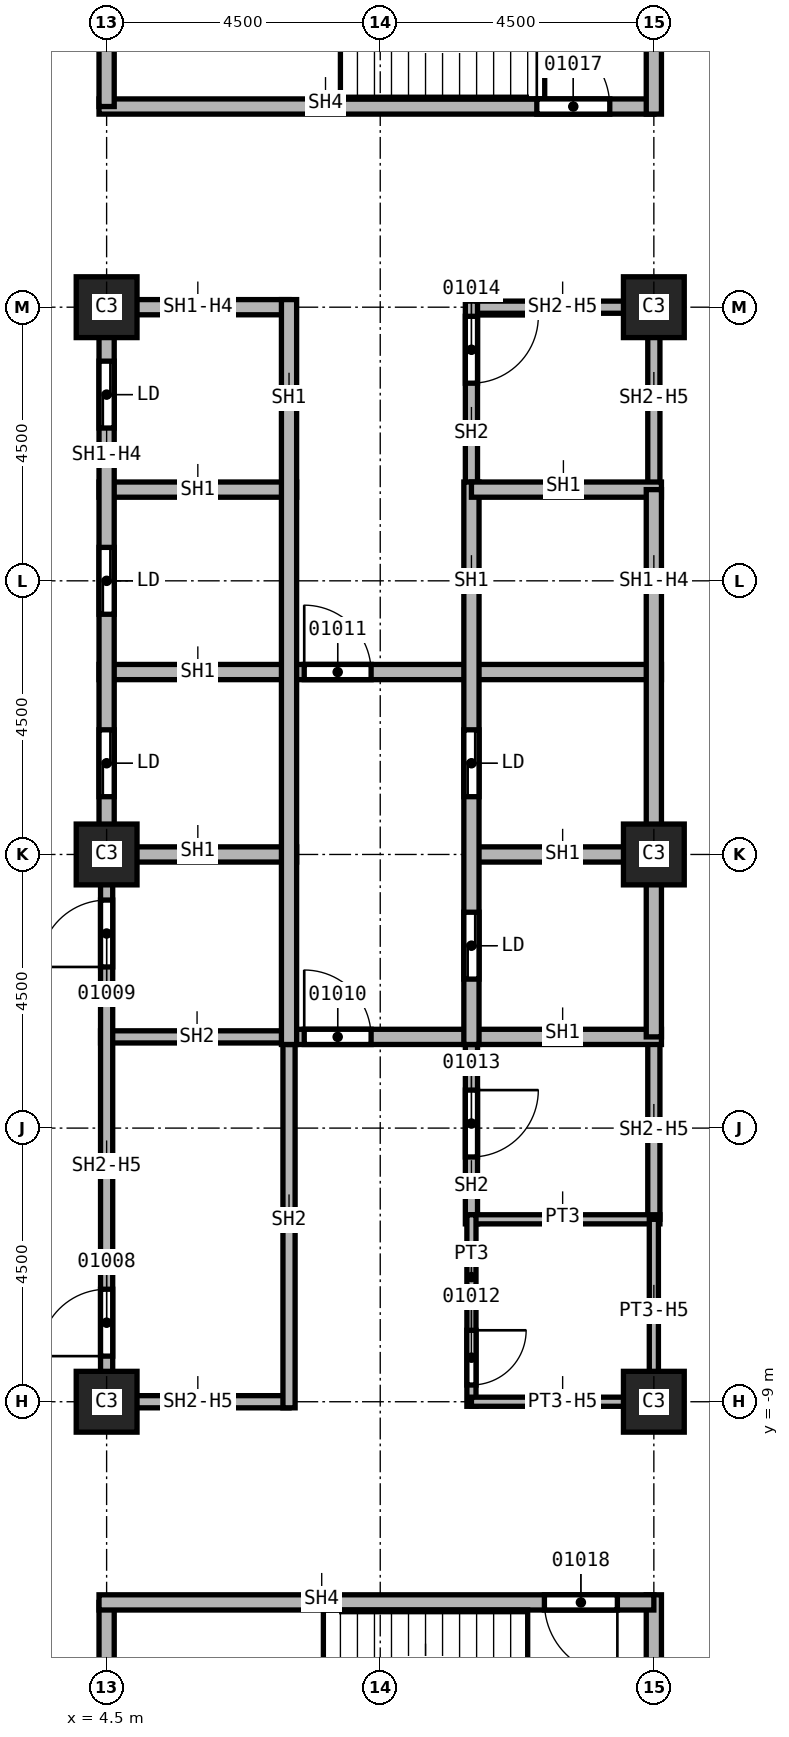
"""IFC4 building model, lengths in metres.
Left out: names, types, materials, properties, quantities, classifications, styles, units other than length and angle.
Written with IfcOpenShell. Run it as: python <this file> out.ifc"""

import sys

from ifc_helpers import new_model, si_unit, direction, frame, frame_2d, origin, origin_2d, place, context, subcontext, project, spatial, rectangle, extrude, element, fill, save


model = new_model("IFC4")
c1 = context("Model", 3, precision=1e-05, world=origin(), true_north=direction((0.0, 1.0)))
c2 = subcontext(c1, "Body", "Model", "MODEL_VIEW")
j1 = project(units=[si_unit("LENGTHUNIT", "METRE"), si_unit("PLANEANGLEUNIT", "RADIAN")], contexts=[c1])
p1 = place(None, origin())
s1 = spatial("IfcSite", under=j1, at=p1, CompositionType="ELEMENT")
p2 = place(p1, origin())
s2 = spatial("IfcBuilding", under=s1, at=p2, CompositionType="ELEMENT")
p3 = place(p2, frame((0.0, 0.0, 72.0)))
s3 = spatial("IfcBuildingStorey", under=s2, at=p3, CompositionType="ELEMENT", Elevation=72.0)
for number, where, z_axis, x_axis in (
    (1, (4.5, 0.0, 0.0), (0.0, 0.0, 1.0), (1.0, 0.0, 0.0)),
    (2, (4.5, 9.0, 0.0), (0.0, 0.0, 1.0), (1.0, 0.0, 0.0)),
    (3, (4.5, -9.0, 0.0), (0.0, 0.0, 1.0), (1.0, 0.0, 0.0)),
    (4, (13.5, 0.0, 0.0), (0.0, 0.0, 1.0), (1.0, 0.0, 0.0)),
    (5, (13.5, 9.0, 0.0), (0.0, 0.0, 1.0), (1.0, 0.0, 0.0)),
    (6, (13.5, -9.0, 0.0), (0.0, 0.0, 1.0), (1.0, 0.0, 0.0)),
):
    element("IfcColumn", number, at=place(p3, frame(where, z_axis=z_axis, x_axis=x_axis)), inside=s3, PredefinedType="COLUMN", context=c2, shape_type="SweptSolid", body=[
        extrude(rectangle(XDim=1.0, YDim=1.0, at=origin_2d()), origin(), (0.0, 0.0, 1.0), 3.7),
    ])
p4 = place(p3, frame((4.4, -3.0, 0.0), z_axis=(0.0, 0.0, 1.0), x_axis=(1.0, 0.0, 0.0)))
e7 = element("IfcWall", 7, at=p4, inside=s3, PredefinedType="SOLIDWALL", context=c2, shape_type="SweptSolid", body=[
    extrude(rectangle(XDim=3.225, YDim=0.2, at=frame_2d((1.613, 0.0))), origin(), (0.0, 0.0, 1.0), 3.7),
])
p5 = place(p3, frame((4.5, -9.1, 0.0), z_axis=(0.0, 0.0, 1.0), x_axis=(0.0, 1.0, 0.0)))
e8 = element("IfcWall", 8, at=p5, inside=s3, PredefinedType="SOLIDWALL", context=c2, shape_type="SweptSolid", body=[
    extrude(rectangle(XDim=9.1, YDim=0.2, at=frame_2d((4.55, 0.0))), origin(), (0.0, 0.0, 1.0), 2.938),
])
p6 = place(p5, frame((0.85, 0.0, 0.0)))
e9 = element("IfcOpeningElement", 9, at=p6, cuts=e8, PredefinedType="OPENING", context=c2, shape_type="SweptSolid", body=[
    extrude(rectangle(XDim=1.1, YDim=2.1, at=frame_2d((0.55, 1.05))), frame((0.0, 0.1, 0.0), z_axis=(0.0, -1.0, 0.0), x_axis=(1.0, 0.0, 0.0)), (0.0, 0.0, 1.0), 0.2),
])
p7 = place(p5, frame((7.25, 0.0, 0.0)))
e10 = element("IfcOpeningElement", 10, at=p7, cuts=e8, PredefinedType="OPENING", context=c2, shape_type="SweptSolid", body=[
    extrude(rectangle(XDim=1.1, YDim=2.1, at=frame_2d((0.55, 1.05))), frame((0.0, 0.1, 0.0), z_axis=(0.0, -1.0, 0.0), x_axis=(1.0, 0.0, 0.0)), (0.0, 0.0, 1.0), 0.2),
])
p8 = place(p3, frame((7.5, -9.0, 0.0), z_axis=(0.0, 0.0, 1.0), x_axis=(-1.0, 0.0, 0.0)))
e11 = element("IfcWall", 11, at=p8, inside=s3, PredefinedType="SOLIDWALL", context=c2, shape_type="SweptSolid", body=[
    extrude(rectangle(XDim=3.0, YDim=0.2, at=frame_2d((1.5, 0.0))), origin(), (0.0, 0.0, 1.0), 2.938),
])
p9 = place(p3, frame((7.5, -2.875, 0.0), z_axis=(0.0, 0.0, 1.0), x_axis=(0.0, -1.0, 0.0)))
e12 = element("IfcWall", 12, at=p9, inside=s3, PredefinedType="SOLIDWALL", context=c2, shape_type="SweptSolid", body=[
    extrude(rectangle(XDim=6.225, YDim=0.2, at=frame_2d((3.113, 0.0))), origin(), (0.0, 0.0, 1.0), 3.7),
])
p10 = place(p3, frame((10.5, -2.875, 0.0), z_axis=(0.0, 0.0, 1.0), x_axis=(0.0, -1.0, 0.0)))
e13 = element("IfcWall", 13, at=p10, inside=s3, PredefinedType="SOLIDWALL", context=c2, shape_type="SweptSolid", body=[
    extrude(rectangle(XDim=3.2, YDim=0.2, at=frame_2d((1.6, 0.0))), origin(), (0.0, 0.0, 1.0), 3.7),
])
p11 = place(p10, frame((1.0, 0.0, 0.0)))
e14 = element("IfcOpeningElement", 14, at=p11, cuts=e13, PredefinedType="OPENING", context=c2, shape_type="SweptSolid", body=[
    extrude(rectangle(XDim=1.1, YDim=2.1, at=frame_2d((0.55, 1.05))), frame((0.0, 0.1, 0.0), z_axis=(0.0, -1.0, 0.0), x_axis=(1.0, 0.0, 0.0)), (0.0, 0.0, 1.0), 0.2),
])
p12 = place(p3, frame((10.5, 9.0, 0.0), z_axis=(0.0, 0.0, 1.0), x_axis=(1.0, 0.0, 0.0)))
e15 = element("IfcWall", 15, at=p12, inside=s3, PredefinedType="SOLIDWALL", context=c2, shape_type="SweptSolid", body=[
    extrude(rectangle(XDim=3.0, YDim=0.2, at=frame_2d((1.5, 0.0))), origin(), (0.0, 0.0, 1.0), 2.938),
])
p13 = place(p3, frame((10.5, 9.1, 0.0), z_axis=(0.0, 0.0, 1.0), x_axis=(0.0, -1.0, 0.0)))
e16 = element("IfcWall", 16, at=p13, inside=s3, PredefinedType="SOLIDWALL", context=c2, shape_type="SweptSolid", body=[
    extrude(rectangle(XDim=3.225, YDim=0.2, at=frame_2d((1.613, 0.0))), origin(), (0.0, 0.0, 1.0), 3.7),
])
p14 = place(p13, frame((0.25, 0.0, 0.0)))
e17 = element("IfcOpeningElement", 17, at=p14, cuts=e16, PredefinedType="OPENING", context=c2, shape_type="SweptSolid", body=[
    extrude(rectangle(XDim=1.1, YDim=2.1, at=frame_2d((0.55, 1.05))), frame((0.0, 0.1, 0.0), z_axis=(0.0, -1.0, 0.0), x_axis=(1.0, 0.0, 0.0)), (0.0, 0.0, 1.0), 0.2),
])
p15 = place(p3, frame((13.5, -3.0, 0.0), z_axis=(0.0, 0.0, 1.0), x_axis=(0.0, -1.0, 0.0)))
e18 = element("IfcWall", 18, at=p15, inside=s3, PredefinedType="SOLIDWALL", context=c2, shape_type="SweptSolid", body=[
    extrude(rectangle(XDim=3.0, YDim=0.2, at=frame_2d((1.5, 0.0))), origin(), (0.0, 0.0, 1.0), 2.938),
])
p16 = place(p3, frame((13.5, 9.1, 0.0), z_axis=(0.0, 0.0, 1.0), x_axis=(0.0, -1.0, 0.0)))
e19 = element("IfcWall", 19, at=p16, inside=s3, PredefinedType="SOLIDWALL", context=c2, shape_type="SweptSolid", body=[
    extrude(rectangle(XDim=3.1, YDim=0.2, at=frame_2d((1.55, 0.0))), origin(), (0.0, 0.0, 1.0), 2.938),
])
p17 = place(p3, frame((4.375, 0.0, 0.0), z_axis=(0.0, 0.0, 1.0), x_axis=(1.0, 0.0, 0.0)))
e20 = element("IfcWall", 20, at=p17, inside=s3, PredefinedType="SOLIDWALL", context=c2, shape_type="SweptSolid", body=[
    extrude(rectangle(XDim=3.25, YDim=0.25, at=frame_2d((1.625, 0.0))), origin(), (0.0, 0.0, 1.0), 3.7),
])
p18 = place(p3, frame((4.375, 3.0, 0.0), z_axis=(0.0, 0.0, 1.0), x_axis=(1.0, 0.0, 0.0)))
e21 = element("IfcWall", 21, at=p18, inside=s3, PredefinedType="SOLIDWALL", context=c2, shape_type="SweptSolid", body=[
    extrude(rectangle(XDim=9.25, YDim=0.25, at=frame_2d((4.625, 0.0))), origin(), (0.0, 0.0, 1.0), 3.7),
])
p19 = place(p18, frame((3.375, 0.0, 0.0)))
e22 = element("IfcOpeningElement", 22, at=p19, cuts=e21, PredefinedType="OPENING", context=c2, shape_type="SweptSolid", body=[
    extrude(rectangle(XDim=1.1, YDim=2.1, at=frame_2d((0.55, 1.05))), frame((0.0, 0.125, 0.0), z_axis=(0.0, -1.0, 0.0), x_axis=(1.0, 0.0, 0.0)), (0.0, 0.0, 1.0), 0.25),
])
p20 = place(p3, frame((4.375, 6.0, 0.0), z_axis=(0.0, 0.0, 1.0), x_axis=(1.0, 0.0, 0.0)))
e23 = element("IfcWall", 23, at=p20, inside=s3, PredefinedType="SOLIDWALL", context=c2, shape_type="SweptSolid", body=[
    extrude(rectangle(XDim=3.25, YDim=0.25, at=frame_2d((1.625, 0.0))), origin(), (0.0, 0.0, 1.0), 3.7),
])
p21 = place(p3, frame((4.5, 0.0, 0.0), z_axis=(0.0, 0.0, 1.0), x_axis=(0.0, 1.0, 0.0)))
e24 = element("IfcWall", 24, at=p21, inside=s3, PredefinedType="SOLIDWALL", context=c2, shape_type="SweptSolid", body=[
    extrude(rectangle(XDim=9.125, YDim=0.25, at=frame_2d((4.562, 0.0))), origin(), (0.0, 0.0, 1.0), 2.938),
])
p22 = place(p21, frame((0.95, 0.0, 0.0)))
e25 = element("IfcOpeningElement", 25, at=p22, cuts=e24, PredefinedType="OPENING", context=c2, shape_type="SweptSolid", body=[
    extrude(rectangle(XDim=1.1, YDim=2.1, at=frame_2d((0.55, 1.05))), frame((0.0, 0.125, 0.0), z_axis=(0.0, -1.0, 0.0), x_axis=(1.0, 0.0, 0.0)), (0.0, 0.0, 1.0), 0.25),
])
p23 = place(p21, frame((3.95, 0.0, 0.0)))
e26 = element("IfcOpeningElement", 26, at=p23, cuts=e24, PredefinedType="OPENING", context=c2, shape_type="SweptSolid", body=[
    extrude(rectangle(XDim=1.1, YDim=2.1, at=frame_2d((0.55, 1.05))), frame((0.0, 0.125, 0.0), z_axis=(0.0, -1.0, 0.0), x_axis=(1.0, 0.0, 0.0)), (0.0, 0.0, 1.0), 0.25),
])
p24 = place(p21, frame((7.012, 0.0, 0.0)))
e27 = element("IfcOpeningElement", 27, at=p24, cuts=e24, PredefinedType="OPENING", context=c2, shape_type="SweptSolid", body=[
    extrude(rectangle(XDim=1.1, YDim=2.1, at=frame_2d((0.55, 1.05))), frame((0.0, 0.125, 0.0), z_axis=(0.0, -1.0, 0.0), x_axis=(1.0, 0.0, 0.0)), (0.0, 0.0, 1.0), 0.25),
])
p25 = place(p3, frame((4.5, 9.0, 0.0), z_axis=(0.0, 0.0, 1.0), x_axis=(1.0, 0.0, 0.0)))
e28 = element("IfcWall", 28, at=p25, inside=s3, PredefinedType="SOLIDWALL", context=c2, shape_type="SweptSolid", body=[
    extrude(rectangle(XDim=3.0, YDim=0.25, at=frame_2d((1.5, 0.0))), origin(), (0.0, 0.0, 1.0), 2.938),
])
p26 = place(p3, frame((7.5, -3.0, 0.0), z_axis=(0.0, 0.0, 1.0), x_axis=(1.0, 0.0, 0.0)))
e29 = element("IfcWall", 29, at=p26, inside=s3, PredefinedType="SOLIDWALL", context=c2, shape_type="SweptSolid", body=[
    extrude(rectangle(XDim=6.125, YDim=0.25, at=frame_2d((3.062, 0.0))), origin(), (0.0, 0.0, 1.0), 3.7),
])
p27 = place(p26, frame((0.25, 0.0, 0.0)))
e30 = element("IfcOpeningElement", 30, at=p27, cuts=e29, PredefinedType="OPENING", context=c2, shape_type="SweptSolid", body=[
    extrude(rectangle(XDim=1.1, YDim=2.1, at=frame_2d((0.55, 1.05))), frame((0.0, 0.125, 0.0), z_axis=(0.0, -1.0, 0.0), x_axis=(1.0, 0.0, 0.0)), (0.0, 0.0, 1.0), 0.25),
])
p28 = place(p3, frame((7.5, 9.125, 0.0), z_axis=(0.0, 0.0, 1.0), x_axis=(0.0, -1.0, 0.0)))
e31 = element("IfcWall", 31, at=p28, inside=s3, PredefinedType="SOLIDWALL", context=c2, shape_type="SweptSolid", body=[
    extrude(rectangle(XDim=12.25, YDim=0.25, at=frame_2d((6.125, 0.0))), origin(), (0.0, 0.0, 1.0), 3.7),
])
p29 = place(p3, frame((10.5, 0.0, 0.0), z_axis=(0.0, 0.0, 1.0), x_axis=(1.0, 0.0, 0.0)))
e32 = element("IfcWall", 32, at=p29, inside=s3, PredefinedType="SOLIDWALL", context=c2, shape_type="SweptSolid", body=[
    extrude(rectangle(XDim=3.125, YDim=0.25, at=frame_2d((1.562, 0.0))), origin(), (0.0, 0.0, 1.0), 3.7),
])
p30 = place(p3, frame((10.5, 6.125, 0.0), z_axis=(0.0, 0.0, 1.0), x_axis=(0.0, -1.0, 0.0)))
e33 = element("IfcWall", 33, at=p30, inside=s3, PredefinedType="SOLIDWALL", context=c2, shape_type="SweptSolid", body=[
    extrude(rectangle(XDim=9.25, YDim=0.25, at=frame_2d((4.625, 0.0))), origin(), (0.0, 0.0, 1.0), 3.7),
])
p31 = place(p30, frame((7.075, 0.0, 0.0)))
e34 = element("IfcOpeningElement", 34, at=p31, cuts=e33, PredefinedType="OPENING", context=c2, shape_type="SweptSolid", body=[
    extrude(rectangle(XDim=1.1, YDim=2.1, at=frame_2d((0.55, 1.05))), frame((0.0, 0.125, 0.0), z_axis=(0.0, -1.0, 0.0), x_axis=(1.0, 0.0, 0.0)), (0.0, 0.0, 1.0), 0.25),
])
p32 = place(p30, frame((4.075, 0.0, 0.0)))
e35 = element("IfcOpeningElement", 35, at=p32, cuts=e33, PredefinedType="OPENING", context=c2, shape_type="SweptSolid", body=[
    extrude(rectangle(XDim=1.1, YDim=2.1, at=frame_2d((0.55, 1.05))), frame((0.0, 0.125, 0.0), z_axis=(0.0, -1.0, 0.0), x_axis=(1.0, 0.0, 0.0)), (0.0, 0.0, 1.0), 0.25),
])
p33 = place(p3, frame((10.5, 6.0, 0.0), z_axis=(0.0, 0.0, 1.0), x_axis=(1.0, 0.0, 0.0)))
e36 = element("IfcWall", 36, at=p33, inside=s3, PredefinedType="SOLIDWALL", context=c2, shape_type="SweptSolid", body=[
    extrude(rectangle(XDim=3.125, YDim=0.25, at=frame_2d((1.562, 0.0))), origin(), (0.0, 0.0, 1.0), 3.7),
])
p34 = place(p3, frame((13.5, 6.0, 0.0), z_axis=(0.0, 0.0, 1.0), x_axis=(0.0, -1.0, 0.0)))
e37 = element("IfcWall", 37, at=p34, inside=s3, PredefinedType="SOLIDWALL", context=c2, shape_type="SweptSolid", body=[
    extrude(rectangle(XDim=9.0, YDim=0.25, at=frame_2d((4.5, 0.0))), origin(), (0.0, 0.0, 1.0), 2.938),
])
p35 = place(p3, frame((4.375, 12.3, 0.0), z_axis=(0.0, 0.0, 1.0), x_axis=(1.0, 0.0, 0.0)))
e38 = element("IfcWall", 38, at=p35, inside=s3, PredefinedType="SOLIDWALL", context=c2, shape_type="SweptSolid", body=[
    extrude(rectangle(XDim=9.125, YDim=0.25, at=frame_2d((4.562, 0.0))), origin(), (0.0, 0.0, 1.0), 3.7),
])
p36 = place(p35, frame((7.2, 0.0, 0.0)))
e39 = element("IfcOpeningElement", 39, at=p36, cuts=e38, PredefinedType="OPENING", context=c2, shape_type="SweptSolid", body=[
    extrude(rectangle(XDim=1.2, YDim=2.1, at=frame_2d((0.6, 1.05))), frame((0.0, 0.125, 0.0), z_axis=(0.0, -1.0, 0.0), x_axis=(1.0, 0.0, 0.0)), (0.0, 0.0, 1.0), 0.25),
])
for number, where, z_axis, x_axis in (
    (40, (4.5, -16.8, 0.0), (0.0, 0.0, 1.0), (0.0, 1.0, 0.0)),
    (41, (4.5, 12.3, 0.0), (0.0, 0.0, 1.0), (0.0, 1.0, 0.0)),
):
    element("IfcWall", number, at=place(p3, frame(where, z_axis=z_axis, x_axis=x_axis)), inside=s3, PredefinedType="SOLIDWALL", context=c2, shape_type="SweptSolid", body=[
        extrude(rectangle(XDim=4.5, YDim=0.25, at=frame_2d((2.25, 0.0))), origin(), (0.0, 0.0, 1.0), 3.7),
    ])
p37 = place(p3, frame((13.5, -16.925, 0.0), z_axis=(0.0, 0.0, 1.0), x_axis=(0.0, 1.0, 0.0)))
e42 = element("IfcWall", 42, at=p37, inside=s3, PredefinedType="SOLIDWALL", context=c2, shape_type="SweptSolid", body=[
    extrude(rectangle(XDim=4.75, YDim=0.25, at=frame_2d((2.375, 0.0))), origin(), (0.0, 0.0, 1.0), 3.7),
])
p38 = place(p3, frame((13.5, -12.3, 0.0), z_axis=(0.0, 0.0, 1.0), x_axis=(-1.0, 0.0, 0.0)))
e43 = element("IfcWall", 43, at=p38, inside=s3, PredefinedType="SOLIDWALL", context=c2, shape_type="SweptSolid", body=[
    extrude(rectangle(XDim=9.125, YDim=0.25, at=frame_2d((4.562, 0.0))), origin(), (0.0, 0.0, 1.0), 3.7),
])
p39 = place(p38, frame((0.6, 0.0, 0.0)))
e44 = element("IfcOpeningElement", 44, at=p39, cuts=e43, PredefinedType="OPENING", context=c2, shape_type="SweptSolid", body=[
    extrude(rectangle(XDim=1.2, YDim=2.1, at=frame_2d((0.6, 1.05))), frame((0.0, 0.125, 0.0), z_axis=(0.0, -1.0, 0.0), x_axis=(1.0, 0.0, 0.0)), (0.0, 0.0, 1.0), 0.25),
])
p40 = place(p3, frame((13.5, 12.175, 0.0), z_axis=(0.0, 0.0, 1.0), x_axis=(0.0, 1.0, 0.0)))
e45 = element("IfcWall", 45, at=p40, inside=s3, PredefinedType="SOLIDWALL", context=c2, shape_type="SweptSolid", body=[
    extrude(rectangle(XDim=4.75, YDim=0.25, at=frame_2d((2.375, 0.0))), origin(), (0.0, 0.0, 1.0), 3.7),
])
p41 = place(p3, frame((10.5, -6.0, 0.0), z_axis=(0.0, 0.0, 1.0), x_axis=(1.0, 0.0, 0.0)))
e46 = element("IfcWall", 46, at=p41, inside=s3, PredefinedType="PARTITIONING", context=c2, shape_type="SweptSolid", body=[
    extrude(rectangle(XDim=3.1, YDim=0.15, at=frame_2d((1.55, 0.0))), origin(), (0.0, 0.0, 1.0), 3.7),
])
p42 = place(p3, frame((10.5, -5.925, 0.0), z_axis=(0.0, 0.0, 1.0), x_axis=(0.0, -1.0, 0.0)))
e47 = element("IfcWall", 47, at=p42, inside=s3, PredefinedType="PARTITIONING", context=c2, shape_type="SweptSolid", body=[
    extrude(rectangle(XDim=3.15, YDim=0.15, at=frame_2d((1.575, 0.0))), origin(), (0.0, 0.0, 1.0), 3.7),
])
p43 = place(p42, frame((1.9, 0.0, 0.0)))
e48 = element("IfcOpeningElement", 48, at=p43, cuts=e47, PredefinedType="OPENING", context=c2, shape_type="SweptSolid", body=[
    extrude(rectangle(XDim=0.9, YDim=2.1, at=frame_2d((0.45, 1.05))), frame((0.0, 0.075, 0.0), z_axis=(0.0, -1.0, 0.0), x_axis=(1.0, 0.0, 0.0)), (0.0, 0.0, 1.0), 0.15),
])
p44 = place(p3, frame((13.5, -9.0, 0.0), z_axis=(0.0, 0.0, 1.0), x_axis=(-1.0, 0.0, 0.0)))
e49 = element("IfcWall", 49, at=p44, inside=s3, PredefinedType="PARTITIONING", context=c2, shape_type="SweptSolid", body=[
    extrude(rectangle(XDim=3.0, YDim=0.15, at=frame_2d((1.5, 0.0))), origin(), (0.0, 0.0, 1.0), 2.938),
])
p45 = place(p3, frame((13.5, -6.0, 0.0), z_axis=(0.0, 0.0, 1.0), x_axis=(0.0, -1.0, 0.0)))
e50 = element("IfcWall", 50, at=p45, inside=s3, PredefinedType="PARTITIONING", context=c2, shape_type="SweptSolid", body=[
    extrude(rectangle(XDim=3.075, YDim=0.15, at=frame_2d((1.538, 0.0))), origin(), (0.0, 0.0, 1.0), 2.938),
])
p46 = place(p6, origin())
e51 = element("IfcDoor", 51, at=p46, inside=s3, OperationType="SINGLE_SWING_LEFT", PredefinedType="DOOR", context=c2, shape_type="SweptSolid", body=[
    extrude(rectangle(XDim=1.1, YDim=2.1, at=frame_2d((0.55, 1.05))), frame((0.0, 0.025, 0.0), z_axis=(0.0, -1.0, 0.0), x_axis=(1.0, 0.0, 0.0)), (0.0, 0.0, 1.0), 0.05),
])
fill(e9, e51)
p47 = place(p7, origin())
e52 = element("IfcDoor", 52, at=p47, inside=s3, OperationType="SINGLE_SWING_RIGHT", PredefinedType="DOOR", context=c2, shape_type="SweptSolid", body=[
    extrude(rectangle(XDim=1.1, YDim=2.1, at=frame_2d((0.55, 1.05))), frame((0.0, 0.025, 0.0), z_axis=(0.0, -1.0, 0.0), x_axis=(1.0, 0.0, 0.0)), (0.0, 0.0, 1.0), 0.05),
])
fill(e10, e52)
p48 = place(p27, origin())
e53 = element("IfcDoor", 53, at=p48, inside=s3, OperationType="SINGLE_SWING_LEFT", PredefinedType="DOOR", context=c2, shape_type="SweptSolid", body=[
    extrude(rectangle(XDim=1.1, YDim=2.1, at=frame_2d((0.55, 1.05))), frame((0.0, 0.025, 0.0), z_axis=(0.0, -1.0, 0.0), x_axis=(1.0, 0.0, 0.0)), (0.0, 0.0, 1.0), 0.05),
])
fill(e30, e53)
p49 = place(p19, origin())
e54 = element("IfcDoor", 54, at=p49, inside=s3, OperationType="SINGLE_SWING_RIGHT", PredefinedType="DOOR", context=c2, shape_type="SweptSolid", body=[
    extrude(rectangle(XDim=1.1, YDim=2.1, at=frame_2d((0.55, 1.05))), frame((0.0, 0.025, 0.0), z_axis=(0.0, -1.0, 0.0), x_axis=(1.0, 0.0, 0.0)), (0.0, 0.0, 1.0), 0.05),
])
fill(e22, e54)
p50 = place(p43, origin())
e55 = element("IfcDoor", 55, at=p50, inside=s3, OperationType="SINGLE_SWING_LEFT", PredefinedType="DOOR", context=c2, shape_type="SweptSolid", body=[
    extrude(rectangle(XDim=0.9, YDim=2.1, at=frame_2d((0.45, 1.05))), frame((0.0, 0.025, 0.0), z_axis=(0.0, -1.0, 0.0), x_axis=(1.0, 0.0, 0.0)), (0.0, 0.0, 1.0), 0.05),
])
fill(e48, e55)
p51 = place(p11, origin())
e56 = element("IfcDoor", 56, at=p51, inside=s3, OperationType="SINGLE_SWING_RIGHT", PredefinedType="DOOR", context=c2, shape_type="SweptSolid", body=[
    extrude(rectangle(XDim=1.1, YDim=2.1, at=frame_2d((0.55, 1.05))), frame((0.0, 0.025, 0.0), z_axis=(0.0, -1.0, 0.0), x_axis=(1.0, 0.0, 0.0)), (0.0, 0.0, 1.0), 0.05),
])
fill(e14, e56)
p52 = place(p14, origin())
e57 = element("IfcDoor", 57, at=p52, inside=s3, OperationType="SINGLE_SWING_LEFT", PredefinedType="DOOR", context=c2, shape_type="SweptSolid", body=[
    extrude(rectangle(XDim=1.1, YDim=2.1, at=frame_2d((0.55, 1.05))), frame((0.0, 0.025, 0.0), z_axis=(0.0, -1.0, 0.0), x_axis=(1.0, 0.0, 0.0)), (0.0, 0.0, 1.0), 0.05),
])
fill(e17, e57)
p53 = place(p36, origin())
e58 = element("IfcDoor", 58, at=p53, inside=s3, OperationType="SINGLE_SWING_RIGHT", PredefinedType="DOOR", context=c2, shape_type="SweptSolid", body=[
    extrude(rectangle(XDim=1.2, YDim=2.1, at=frame_2d((0.6, 1.05))), frame((0.0, 0.025, 0.0), z_axis=(0.0, -1.0, 0.0), x_axis=(1.0, 0.0, 0.0)), (0.0, 0.0, 1.0), 0.05),
])
fill(e39, e58)
p54 = place(p39, origin())
e59 = element("IfcDoor", 59, at=p54, inside=s3, OperationType="SINGLE_SWING_LEFT", PredefinedType="DOOR", context=c2, shape_type="SweptSolid", body=[
    extrude(rectangle(XDim=1.2, YDim=2.1, at=frame_2d((0.6, 1.05))), frame((0.0, 0.025, 0.0), z_axis=(0.0, -1.0, 0.0), x_axis=(1.0, 0.0, 0.0)), (0.0, 0.0, 1.0), 0.05),
])
fill(e44, e59)
p55 = place(p22, origin())
e60 = element("IfcDoor", 60, at=p55, inside=s3, OperationType="SLIDING_TO_LEFT", PredefinedType="DOOR", context=c2, shape_type="SweptSolid", body=[
    extrude(rectangle(XDim=1.1, YDim=2.1, at=frame_2d((0.55, 1.05))), frame((0.0, 0.025, 0.0), z_axis=(0.0, -1.0, 0.0), x_axis=(1.0, 0.0, 0.0)), (0.0, 0.0, 1.0), 0.05),
])
fill(e25, e60)
p56 = place(p23, origin())
e61 = element("IfcDoor", 61, at=p56, inside=s3, OperationType="SLIDING_TO_LEFT", PredefinedType="DOOR", context=c2, shape_type="SweptSolid", body=[
    extrude(rectangle(XDim=1.1, YDim=2.1, at=frame_2d((0.55, 1.05))), frame((0.0, 0.025, 0.0), z_axis=(0.0, -1.0, 0.0), x_axis=(1.0, 0.0, 0.0)), (0.0, 0.0, 1.0), 0.05),
])
fill(e26, e61)
p57 = place(p24, origin())
e62 = element("IfcDoor", 62, at=p57, inside=s3, OperationType="SLIDING_TO_LEFT", PredefinedType="DOOR", context=c2, shape_type="SweptSolid", body=[
    extrude(rectangle(XDim=1.1, YDim=2.1, at=frame_2d((0.55, 1.05))), frame((0.0, 0.025, 0.0), z_axis=(0.0, -1.0, 0.0), x_axis=(1.0, 0.0, 0.0)), (0.0, 0.0, 1.0), 0.05),
])
fill(e27, e62)
p58 = place(p31, origin())
e63 = element("IfcDoor", 63, at=p58, inside=s3, OperationType="SLIDING_TO_LEFT", PredefinedType="DOOR", context=c2, shape_type="SweptSolid", body=[
    extrude(rectangle(XDim=1.1, YDim=2.1, at=frame_2d((0.55, 1.05))), frame((0.0, 0.025, 0.0), z_axis=(0.0, -1.0, 0.0), x_axis=(1.0, 0.0, 0.0)), (0.0, 0.0, 1.0), 0.05),
])
fill(e34, e63)
p59 = place(p32, origin())
e64 = element("IfcDoor", 64, at=p59, inside=s3, OperationType="SLIDING_TO_LEFT", PredefinedType="DOOR", context=c2, shape_type="SweptSolid", body=[
    extrude(rectangle(XDim=1.1, YDim=2.1, at=frame_2d((0.55, 1.05))), frame((0.0, 0.025, 0.0), z_axis=(0.0, -1.0, 0.0), x_axis=(1.0, 0.0, 0.0)), (0.0, 0.0, 1.0), 0.05),
])
fill(e35, e64)
save(model, sys.argv[1])
